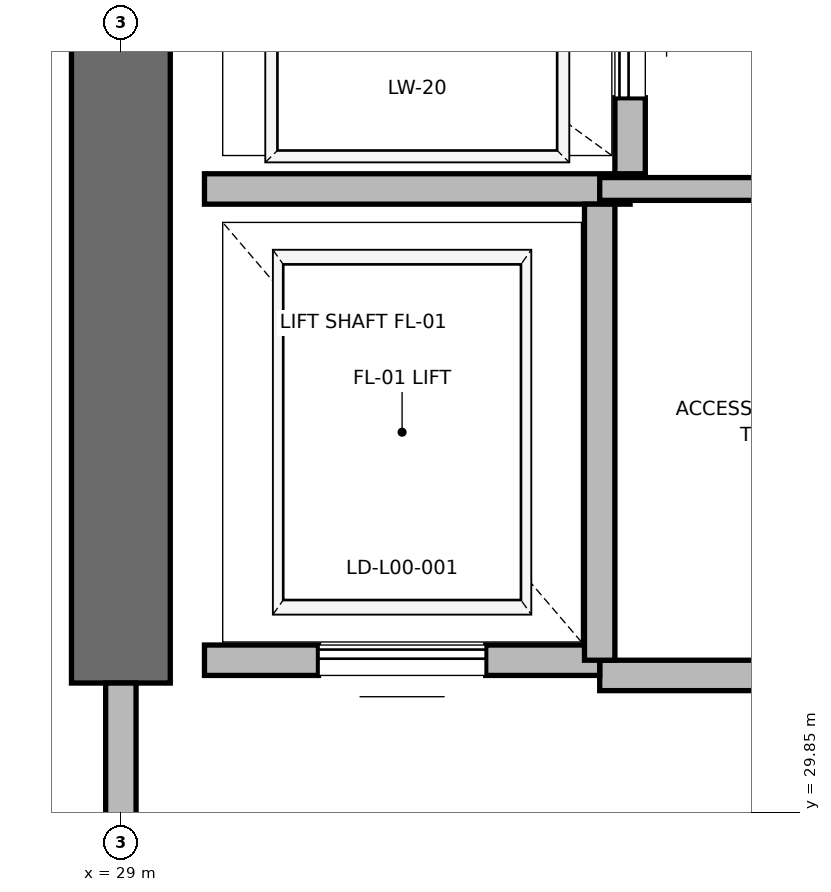
"""IFC4 building model, lengths in metres.
Left out: names, types, materials, properties, quantities, classifications, styles, units other than length and angle.
Written with IfcOpenShell. Run it as: python <this file> out.ifc"""

import sys

from ifc_helpers import new_model, si_unit, direction, frame, frame_2d, origin, place, context, subcontext, project, spatial, rectangle, extrude, element, fill, save


model = new_model("IFC4")
c1 = context("Model", 3, precision=1e-05, world=origin(), true_north=direction((0.0, 1.0)))
c2 = subcontext(c1, "Body", "Model", "MODEL_VIEW")
j1 = project(units=[si_unit("LENGTHUNIT", "METRE"), si_unit("PLANEANGLEUNIT", "RADIAN")], contexts=[c1])
p1 = place(None, origin())
s1 = spatial("IfcSite", under=j1, at=p1, CompositionType="ELEMENT")
p2 = place(p1, origin())
s2 = spatial("IfcBuilding", under=s1, at=p2, CompositionType="ELEMENT")
p3 = place(p2, origin())
s3 = spatial("IfcBuildingStorey", under=s2, at=p3, CompositionType="ELEMENT", Elevation=0.0)
p4 = place(p3, frame((29.0, 30.7, 0.0), z_axis=(0.0, 0.0, 1.0), x_axis=(0.0, 1.0, 0.0)))
e1 = element("IfcWall", 1, at=p4, inside=s3, PredefinedType="SHEAR", context=c2, shape_type="SweptSolid", body=[
    extrude(rectangle(XDim=5.8, YDim=0.65, at=frame_2d((2.9, 0.0))), origin(), (0.0, 0.0, 1.0), 5.72),
])
p5 = place(p3, frame((29.0, 30.7, 0.0), z_axis=(0.0, 0.0, 1.0), x_axis=(0.0, -1.0, 0.0)))
e2 = element("IfcWall", 2, at=p5, inside=s3, PredefinedType="PARTITIONING", context=c2, shape_type="SweptSolid", body=[
    extrude(rectangle(XDim=3.4, YDim=0.2, at=frame_2d((1.7, 0.0))), origin(), (0.0, 0.0, 1.0), 4.5),
])
p6 = place(p5, frame((1.125, 0.0, 0.0)))
e3 = element("IfcOpeningElement", 3, at=p6, cuts=e2, PredefinedType="OPENING", context=c2, shape_type="SweptSolid", body=[
    extrude(rectangle(XDim=1.15, YDim=2.2, at=frame_2d((0.575, 1.1))), frame((0.0, 0.1, 0.0), z_axis=(0.0, -1.0, 0.0), x_axis=(1.0, 0.0, 0.0)), (0.0, 0.0, 1.0), 0.2),
])
p7 = place(p3, frame((32.15, 30.75, 0.0), z_axis=(0.0, 0.0, 1.0), x_axis=(1.0, 0.0, 0.0)))
e4 = element("IfcWall", 4, at=p7, inside=s3, PredefinedType="PARTITIONING", context=c2, shape_type="SweptSolid", body=[
    extrude(rectangle(XDim=3.13, YDim=0.2, at=frame_2d((1.565, 0.0))), origin(), (0.0, 0.0, 1.0), 5.72),
])
p8 = place(p3, frame((29.55, 30.85, 0.0), z_axis=(0.0, 0.0, 1.0), x_axis=(1.0, 0.0, 0.0)))
e5 = element("IfcWall", 5, at=p8, inside=s3, PredefinedType="SOLIDWALL", context=c2, shape_type="SweptSolid", body=[
    extrude(rectangle(XDim=2.6, YDim=0.2, at=frame_2d((1.3, 0.0))), origin(), (0.0, 0.0, 1.0), 4.5),
])
p9 = place(p8, frame((0.75, 0.0, 0.0)))
e6 = element("IfcOpeningElement", 6, at=p9, cuts=e5, PredefinedType="OPENING", context=c2, shape_type="SweptSolid", body=[
    extrude(rectangle(XDim=1.1, YDim=2.2, at=frame_2d((0.55, 1.1))), frame((0.0, 0.1, 0.0), z_axis=(0.0, -1.0, 0.0), x_axis=(1.0, 0.0, 0.0)), (0.0, 0.0, 1.0), 0.2),
])
p10 = place(p3, frame((29.55, 33.95, 0.0), z_axis=(0.0, 0.0, 1.0), x_axis=(1.0, 0.0, 0.0)))
e7 = element("IfcWall", 7, at=p10, inside=s3, PredefinedType="SOLIDWALL", context=c2, shape_type="SweptSolid", body=[
    extrude(rectangle(XDim=2.8, YDim=0.2, at=frame_2d((1.4, 0.0))), origin(), (0.0, 0.0, 1.0), 5.72),
])
p11 = place(p3, frame((32.15, 30.85, 0.0), z_axis=(0.0, 0.0, 1.0), x_axis=(0.0, 1.0, 0.0)))
e8 = element("IfcWall", 8, at=p11, inside=s3, PredefinedType="SOLIDWALL", context=c2, shape_type="SweptSolid", body=[
    extrude(rectangle(XDim=3.0, YDim=0.2, at=frame_2d((1.5, 0.0))), origin(), (0.0, 0.0, 1.0), 5.72),
])
p12 = place(p3, frame((32.35, 34.05, 0.0), z_axis=(0.0, 0.0, 1.0), x_axis=(0.0, 1.0, 0.0)))
e9 = element("IfcWall", 9, at=p12, inside=s3, PredefinedType="SOLIDWALL", context=c2, shape_type="SweptSolid", body=[
    extrude(rectangle(XDim=2.1, YDim=0.2, at=frame_2d((1.05, 0.0))), origin(), (0.0, 0.0, 1.0), 5.72),
])
p13 = place(p12, frame((0.5, 0.0, 0.0)))
e10 = element("IfcOpeningElement", 10, at=p13, cuts=e9, PredefinedType="OPENING", context=c2, shape_type="SweptSolid", body=[
    extrude(rectangle(XDim=1.1, YDim=2.2, at=frame_2d((0.55, 1.1))), frame((0.0, 0.1, 0.0), z_axis=(0.0, -1.0, 0.0), x_axis=(1.0, 0.0, 0.0)), (0.0, 0.0, 1.0), 0.2),
])
p14 = place(p3, frame((32.15, 33.95, 0.0), z_axis=(0.0, 0.0, 1.0), x_axis=(1.0, 0.0, 0.0)))
e11 = element("IfcWall", 11, at=p14, inside=s3, PredefinedType="PARTITIONING", context=c2, shape_type="SweptSolid", body=[
    extrude(rectangle(XDim=3.13, YDim=0.15, at=frame_2d((1.565, 0.0))), origin(), (0.0, 0.0, 1.0), 2.85),
])
p15 = place(p9, origin())
e12 = element("IfcDoor", 12, at=p15, inside=s3, OperationType="SLIDING_TO_RIGHT", PredefinedType="DOOR", context=c2, shape_type="SweptSolid", body=[
    extrude(rectangle(XDim=1.1, YDim=2.2, at=frame_2d((0.55, 1.1))), frame((0.0, 0.025, 0.0), z_axis=(0.0, -1.0, 0.0), x_axis=(1.0, 0.0, 0.0)), (0.0, 0.0, 1.0), 0.05),
])
fill(e6, e12)
p16 = place(p13, origin())
e13 = element("IfcDoor", 13, at=p16, inside=s3, OperationType="SLIDING_TO_RIGHT", PredefinedType="DOOR", context=c2, shape_type="SweptSolid", body=[
    extrude(rectangle(XDim=1.1, YDim=2.2, at=frame_2d((0.55, 1.1))), frame((0.0, 0.025, 0.0), z_axis=(0.0, -1.0, 0.0), x_axis=(1.0, 0.0, 0.0)), (0.0, 0.0, 1.0), 0.05),
])
fill(e10, e13)
save(model, sys.argv[1])
